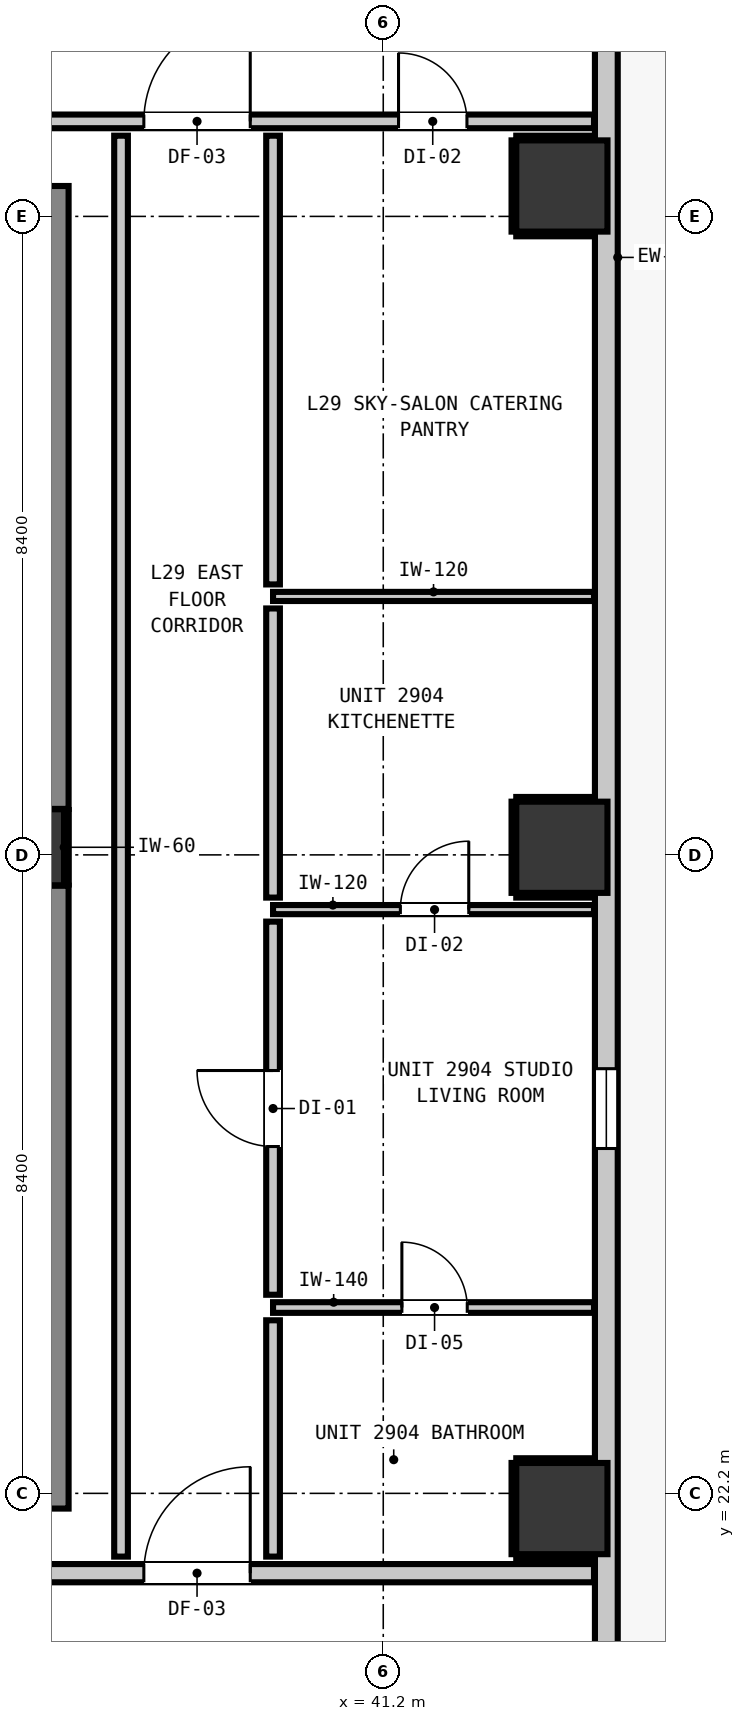
"""IFC4 building model, lengths in metres.
Left out: names, types, materials, properties, quantities, classifications, styles, units other than length and angle.
Written with IfcOpenShell. Run it as: python <this file> out.ifc"""

import sys

from ifc_helpers import new_model, si_unit, direction, frame, frame_2d, origin, origin_2d, place, context, subcontext, project, spatial, rectangle, extrude, element, fill, save


model = new_model("IFC4")
c1 = context("Model", 3, precision=1e-05, world=origin(), true_north=direction((0.0, 1.0)))
c2 = subcontext(c1, "Body", "Model", "MODEL_VIEW")
j1 = project(units=[si_unit("LENGTHUNIT", "METRE"), si_unit("PLANEANGLEUNIT", "RADIAN")], contexts=[c1])
p1 = place(None, origin())
s1 = spatial("IfcSite", under=j1, at=p1, CompositionType="ELEMENT")
p2 = place(p1, origin())
s2 = spatial("IfcBuilding", under=s1, at=p2, CompositionType="ELEMENT")
p3 = place(p2, frame((0.0, 0.0, 102.76)))
s3 = spatial("IfcBuildingStorey", under=s2, at=p3, CompositionType="ELEMENT", Elevation=102.76)
p4 = place(p3, frame((36.5, 30.7, 0.0), z_axis=(0.0, 0.0, 1.0), x_axis=(1.0, 0.0, 0.0)))
e1 = element("IfcColumn", 1, at=p4, inside=s3, PredefinedType="COLUMN", context=c2, shape_type="SweptSolid", body=[
    extrude(rectangle(XDim=1.0, YDim=1.0, at=origin_2d()), origin(), (0.0, 0.0, 1.0), 3.32),
])
p5 = place(p3, frame((36.56, 22.0, 0.0), z_axis=(0.0, 0.0, 1.0), x_axis=(0.0, 1.0, 0.0)))
e2 = element("IfcWall", 2, at=p5, inside=s3, PredefinedType="SHEAR", context=c2, shape_type="SweptSolid", body=[
    extrude(rectangle(XDim=8.195, YDim=1.0, at=frame_2d((4.098, 0.0))), origin(), (0.0, 0.0, 1.0), 3.32),
])
p6 = place(p3, frame((36.56, 31.205, 0.0), z_axis=(0.0, 0.0, 1.0), x_axis=(0.0, 1.0, 0.0)))
e3 = element("IfcWall", 3, at=p6, inside=s3, PredefinedType="SHEAR", context=c2, shape_type="SweptSolid", body=[
    extrude(rectangle(XDim=8.195, YDim=1.0, at=frame_2d((4.097, 0.0))), origin(), (0.0, 0.0, 1.0), 3.32),
])
for number, where, z_axis, x_axis in (
    (4, (43.55, 22.0, 0.0), (0.0, 0.0, 1.0), (1.0, 0.0, 0.0)),
    (5, (43.55, 30.7, 0.0), (0.0, 0.0, 1.0), (1.0, 0.0, 0.0)),
    (6, (43.55, 39.4, 0.0), (0.0, 0.0, 1.0), (1.0, 0.0, 0.0)),
):
    element("IfcColumn", number, at=place(p3, frame(where, z_axis=z_axis, x_axis=x_axis)), inside=s3, PredefinedType="COLUMN", context=c2, shape_type="SweptSolid", body=[
        extrude(rectangle(XDim=1.2, YDim=1.2, at=origin_2d()), origin(), (0.0, 0.0, 1.0), 2.9),
    ])
p7 = place(p3, frame((44.135, 51.035, 0.0), z_axis=(0.0, 0.0, 1.0), x_axis=(0.0, -1.0, 0.0)))
e7 = element("IfcWall", 7, at=p7, inside=s3, PredefinedType="STANDARD", context=c2, shape_type="SweptSolid", body=[
    extrude(rectangle(XDim=34.67, YDim=0.3, at=frame_2d((17.335, 0.0))), origin(), (0.0, 0.0, 1.0), 2.9),
])
p8 = place(p7, frame((0.901, 0.0, 0.0)))
e8 = element("IfcOpeningElement", 8, at=p8, cuts=e7, PredefinedType="OPENING", context=c2, shape_type="SweptSolid", body=[
    extrude(rectangle(XDim=1.0, YDim=2.15, at=frame_2d((0.5, 1.075))), frame((0.0, 0.16, 0.0), z_axis=(0.0, -1.0, 0.0), x_axis=(1.0, 0.0, 0.0)), (0.0, 0.0, 1.0), 0.32),
])
p9 = place(p7, frame((32.608, 0.0, 0.85)))
e9 = element("IfcOpeningElement", 9, at=p9, cuts=e7, PredefinedType="OPENING", context=c2, shape_type="SweptSolid", body=[
    extrude(rectangle(XDim=1.05, YDim=1.65, at=frame_2d((0.525, 0.825))), frame((0.0, 0.16, 0.0), z_axis=(0.0, -1.0, 0.0), x_axis=(1.0, 0.0, 0.0)), (0.0, 0.0, 1.0), 0.32),
])
p10 = place(p7, frame((23.248, 0.0, 0.85)))
e10 = element("IfcOpeningElement", 10, at=p10, cuts=e7, PredefinedType="OPENING", context=c2, shape_type="SweptSolid", body=[
    extrude(rectangle(XDim=1.05, YDim=1.65, at=frame_2d((0.525, 0.825))), frame((0.0, 0.16, 0.0), z_axis=(0.0, -1.0, 0.0), x_axis=(1.0, 0.0, 0.0)), (0.0, 0.0, 1.0), 0.32),
])
p11 = place(p3, frame((1.827, 21.15, 0.0), z_axis=(0.0, 0.0, 1.0), x_axis=(1.0, 0.0, 0.0)))
e11 = element("IfcWall", 11, at=p11, inside=s3, PredefinedType="PARTITIONING", context=c2, shape_type="SweptSolid", body=[
    extrude(rectangle(XDim=42.146, YDim=0.24, at=frame_2d((21.073, 0.0))), origin(), (0.0, 0.0, 1.0), 2.9),
])
p12 = place(p11, frame((16.383, 0.0, 0.0)))
e12 = element("IfcOpeningElement", 12, at=p12, cuts=e11, PredefinedType="OPENING", context=c2, shape_type="SweptSolid", body=[
    extrude(rectangle(XDim=1.1, YDim=2.15, at=frame_2d((0.55, 1.075))), frame((0.0, 0.13, 0.0), z_axis=(0.0, -1.0, 0.0), x_axis=(1.0, 0.0, 0.0)), (0.0, 0.0, 1.0), 0.26),
])
p13 = place(p11, frame((8.623, 0.0, 0.0)))
e13 = element("IfcOpeningElement", 13, at=p13, cuts=e11, PredefinedType="OPENING", context=c2, shape_type="SweptSolid", body=[
    extrude(rectangle(XDim=1.4, YDim=2.15, at=frame_2d((0.7, 1.075))), frame((0.0, 0.13, 0.0), z_axis=(0.0, -1.0, 0.0), x_axis=(1.0, 0.0, 0.0)), (0.0, 0.0, 1.0), 0.26),
])
p14 = place(p11, frame((36.223, 0.0, 0.0)))
e14 = element("IfcOpeningElement", 14, at=p14, cuts=e11, PredefinedType="OPENING", context=c2, shape_type="SweptSolid", body=[
    extrude(rectangle(XDim=1.4, YDim=2.15, at=frame_2d((0.7, 1.075))), frame((0.0, 0.13, 0.0), z_axis=(0.0, -1.0, 0.0), x_axis=(1.0, 0.0, 0.0)), (0.0, 0.0, 1.0), 0.26),
])
p15 = place(p3, frame((1.827, 40.25, 0.0), z_axis=(0.0, 0.0, 1.0), x_axis=(1.0, 0.0, 0.0)))
e15 = element("IfcWall", 15, at=p15, inside=s3, PredefinedType="PARTITIONING", context=c2, shape_type="SweptSolid", body=[
    extrude(rectangle(XDim=42.146, YDim=0.18, at=frame_2d((21.073, 0.0))), origin(), (0.0, 0.0, 1.0), 2.9),
])
p16 = place(p15, frame((15.608, 0.0, 0.0)))
e16 = element("IfcOpeningElement", 16, at=p16, cuts=e15, PredefinedType="OPENING", context=c2, shape_type="SweptSolid", body=[
    extrude(rectangle(XDim=1.4, YDim=2.15, at=frame_2d((0.7, 1.075))), frame((0.0, 0.1, 0.0), z_axis=(0.0, -1.0, 0.0), x_axis=(1.0, 0.0, 0.0)), (0.0, 0.0, 1.0), 0.2),
])
p17 = place(p15, frame((8.623, 0.0, 0.0)))
e17 = element("IfcOpeningElement", 17, at=p17, cuts=e15, PredefinedType="OPENING", context=c2, shape_type="SweptSolid", body=[
    extrude(rectangle(XDim=1.4, YDim=2.15, at=frame_2d((0.7, 1.075))), frame((0.0, 0.1, 0.0), z_axis=(0.0, -1.0, 0.0), x_axis=(1.0, 0.0, 0.0)), (0.0, 0.0, 1.0), 0.2),
])
p18 = place(p15, frame((36.223, 0.0, 0.0)))
e18 = element("IfcOpeningElement", 18, at=p18, cuts=e15, PredefinedType="OPENING", context=c2, shape_type="SweptSolid", body=[
    extrude(rectangle(XDim=1.4, YDim=2.15, at=frame_2d((0.7, 1.075))), frame((0.0, 0.1, 0.0), z_axis=(0.0, -1.0, 0.0), x_axis=(1.0, 0.0, 0.0)), (0.0, 0.0, 1.0), 0.2),
])
p19 = place(p15, frame((3.697, 0.0, 0.0)))
e19 = element("IfcOpeningElement", 19, at=p19, cuts=e15, PredefinedType="OPENING", context=c2, shape_type="SweptSolid", body=[
    extrude(rectangle(XDim=0.95, YDim=2.1, at=frame_2d((0.475, 1.05))), frame((0.0, 0.1, 0.0), z_axis=(0.0, -1.0, 0.0), x_axis=(1.0, 0.0, 0.0)), (0.0, 0.0, 1.0), 0.2),
])
p20 = place(p15, frame((39.574, 0.0, 0.0)))
e20 = element("IfcOpeningElement", 20, at=p20, cuts=e15, PredefinedType="OPENING", context=c2, shape_type="SweptSolid", body=[
    extrude(rectangle(XDim=0.9, YDim=2.1, at=frame_2d((0.45, 1.05))), frame((0.0, 0.1, 0.0), z_axis=(0.0, -1.0, 0.0), x_axis=(1.0, 0.0, 0.0)), (0.0, 0.0, 1.0), 0.2),
])
p21 = place(p3, frame((39.75, 24.645, 0.0), z_axis=(0.0, 0.0, 1.0), x_axis=(1.0, 0.0, 0.0)))
e21 = element("IfcWall", 21, at=p21, inside=s3, PredefinedType="PARTITIONING", context=c2, shape_type="SweptSolid", body=[
    extrude(rectangle(XDim=4.223, YDim=0.14, at=frame_2d((2.111, 0.0))), origin(), (0.0, 0.0, 1.0), 2.9),
])
p22 = place(p21, frame((1.695, 0.0, 0.0)))
e22 = element("IfcOpeningElement", 22, at=p22, cuts=e21, PredefinedType="OPENING", context=c2, shape_type="SweptSolid", body=[
    extrude(rectangle(XDim=0.86, YDim=2.02, at=frame_2d((0.43, 1.01))), frame((0.0, 0.08, 0.0), z_axis=(0.0, -1.0, 0.0), x_axis=(1.0, 0.0, 0.0)), (0.0, 0.0, 1.0), 0.16),
])
p23 = place(p3, frame((39.75, 29.88, 0.0), z_axis=(0.0, 0.0, 1.0), x_axis=(1.0, 0.0, 0.0)))
e23 = element("IfcWall", 23, at=p23, inside=s3, PredefinedType="PARTITIONING", context=c2, shape_type="SweptSolid", body=[
    extrude(rectangle(XDim=4.223, YDim=0.12, at=frame_2d((2.111, 0.0))), origin(), (0.0, 0.0, 1.0), 2.9),
])
p24 = place(p23, frame((1.675, 0.0, 0.0)))
e24 = element("IfcOpeningElement", 24, at=p24, cuts=e23, PredefinedType="OPENING", context=c2, shape_type="SweptSolid", body=[
    extrude(rectangle(XDim=0.9, YDim=2.1, at=frame_2d((0.45, 1.05))), frame((0.0, 0.07, 0.0), z_axis=(0.0, -1.0, 0.0), x_axis=(1.0, 0.0, 0.0)), (0.0, 0.0, 1.0), 0.14),
])
p25 = place(p3, frame((39.75, 34.0, 0.0), z_axis=(0.0, 0.0, 1.0), x_axis=(1.0, 0.0, 0.0)))
e25 = element("IfcWall", 25, at=p25, inside=s3, PredefinedType="PARTITIONING", context=c2, shape_type="SweptSolid", body=[
    extrude(rectangle(XDim=4.223, YDim=0.12, at=frame_2d((2.111, 0.0))), origin(), (0.0, 0.0, 1.0), 2.9),
])
p26 = place(p3, frame((37.75, 21.368, 0.0), z_axis=(0.0, 0.0, 1.0), x_axis=(0.0, 1.0, 0.0)))
e26 = element("IfcWall", 26, at=p26, inside=s3, PredefinedType="PARTITIONING", context=c2, shape_type="SweptSolid", body=[
    extrude(rectangle(XDim=18.694, YDim=0.18, at=frame_2d((9.347, 0.0))), origin(), (0.0, 0.0, 1.0), 2.9),
])
p27 = place(p3, frame((39.75, 21.368, 0.0), z_axis=(0.0, 0.0, 1.0), x_axis=(0.0, 1.0, 0.0)))
e27 = element("IfcWall", 27, at=p27, inside=s3, PredefinedType="PARTITIONING", context=c2, shape_type="SweptSolid", body=[
    extrude(rectangle(XDim=3.109, YDim=0.18, at=frame_2d((1.555, 0.0))), origin(), (0.0, 0.0, 1.0), 2.9),
])
p28 = place(p3, frame((39.75, 24.813, 0.0), z_axis=(0.0, 0.0, 1.0), x_axis=(0.0, 1.0, 0.0)))
e28 = element("IfcWall", 28, at=p28, inside=s3, PredefinedType="PARTITIONING", context=c2, shape_type="SweptSolid", body=[
    extrude(rectangle(XDim=4.909, YDim=0.18, at=frame_2d((2.455, 0.0))), origin(), (0.0, 0.0, 1.0), 2.9),
])
p29 = place(p28, frame((1.95, 0.0, 0.0)))
e29 = element("IfcOpeningElement", 29, at=p29, cuts=e28, PredefinedType="OPENING", context=c2, shape_type="SweptSolid", body=[
    extrude(rectangle(XDim=1.0, YDim=2.15, at=frame_2d((0.5, 1.075))), frame((0.0, 0.1, 0.0), z_axis=(0.0, -1.0, 0.0), x_axis=(1.0, 0.0, 0.0)), (0.0, 0.0, 1.0), 0.2),
])
p30 = place(p3, frame((39.75, 30.038, 0.0), z_axis=(0.0, 0.0, 1.0), x_axis=(0.0, 1.0, 0.0)))
e30 = element("IfcWall", 30, at=p30, inside=s3, PredefinedType="PARTITIONING", context=c2, shape_type="SweptSolid", body=[
    extrude(rectangle(XDim=3.804, YDim=0.18, at=frame_2d((1.902, 0.0))), origin(), (0.0, 0.0, 1.0), 2.9),
])
p31 = place(p3, frame((39.75, 34.158, 0.0), z_axis=(0.0, 0.0, 1.0), x_axis=(0.0, 1.0, 0.0)))
e31 = element("IfcWall", 31, at=p31, inside=s3, PredefinedType="PARTITIONING", context=c2, shape_type="SweptSolid", body=[
    extrude(rectangle(XDim=5.904, YDim=0.18, at=frame_2d((2.952, 0.0))), origin(), (0.0, 0.0, 1.0), 2.9),
])
p32 = place(p3, frame((37.032, 30.21, 0.0), z_axis=(0.0, 0.0, 1.0), x_axis=(0.0, 1.0, 0.0)))
e32 = element("IfcWall", 32, at=p32, inside=s3, PredefinedType="PARTITIONING", context=c2, shape_type="SweptSolid", body=[
    extrude(rectangle(XDim=0.98, YDim=0.06, at=frame_2d((0.49, 0.0))), origin(), (0.0, 0.0, 1.0), 0.905),
])
for number, where, z_axis, x_axis in (
    (33, (42.95, 21.368, 0.0), (0.0, 0.0, 1.0), (1.0, 0.0, 0.0)),
    (34, (42.95, 22.632, 0.0), (0.0, 0.0, 1.0), (1.0, 0.0, 0.0)),
):
    element("IfcWall", number, at=place(p3, frame(where, z_axis=z_axis, x_axis=x_axis)), inside=s3, PredefinedType="PARTITIONING", context=c2, shape_type="SweptSolid", body=[
        extrude(rectangle(XDim=1.02, YDim=0.06, at=frame_2d((0.51, 0.0))), origin(), (0.0, 0.0, 1.0), 0.905),
    ])
p33 = place(p3, frame((42.918, 21.4, 0.0), z_axis=(0.0, 0.0, 1.0), x_axis=(0.0, 1.0, 0.0)))
e35 = element("IfcWall", 35, at=p33, inside=s3, PredefinedType="PARTITIONING", context=c2, shape_type="SweptSolid", body=[
    extrude(rectangle(XDim=1.2, YDim=0.06, at=frame_2d((0.6, 0.0))), origin(), (0.0, 0.0, 1.0), 1.45),
])
for number, where, z_axis, x_axis in (
    (36, (42.95, 30.068, 0.0), (0.0, 0.0, 1.0), (1.0, 0.0, 0.0)),
    (37, (42.95, 31.332, 0.0), (0.0, 0.0, 1.0), (1.0, 0.0, 0.0)),
):
    element("IfcWall", number, at=place(p3, frame(where, z_axis=z_axis, x_axis=x_axis)), inside=s3, PredefinedType="PARTITIONING", context=c2, shape_type="SweptSolid", body=[
        extrude(rectangle(XDim=1.02, YDim=0.06, at=frame_2d((0.51, 0.0))), origin(), (0.0, 0.0, 1.0), 0.905),
    ])
p34 = place(p3, frame((42.918, 30.1, 0.0), z_axis=(0.0, 0.0, 1.0), x_axis=(0.0, 1.0, 0.0)))
e38 = element("IfcWall", 38, at=p34, inside=s3, PredefinedType="PARTITIONING", context=c2, shape_type="SweptSolid", body=[
    extrude(rectangle(XDim=1.2, YDim=0.06, at=frame_2d((0.6, 0.0))), origin(), (0.0, 0.0, 1.0), 1.45),
])
for number, where, z_axis, x_axis in (
    (39, (42.95, 38.768, 0.0), (0.0, 0.0, 1.0), (1.0, 0.0, 0.0)),
    (40, (42.95, 40.032, 0.0), (0.0, 0.0, 1.0), (1.0, 0.0, 0.0)),
):
    element("IfcWall", number, at=place(p3, frame(where, z_axis=z_axis, x_axis=x_axis)), inside=s3, PredefinedType="PARTITIONING", context=c2, shape_type="SweptSolid", body=[
        extrude(rectangle(XDim=1.02, YDim=0.06, at=frame_2d((0.51, 0.0))), origin(), (0.0, 0.0, 1.0), 0.905),
    ])
p35 = place(p3, frame((42.918, 38.8, 0.0), z_axis=(0.0, 0.0, 1.0), x_axis=(0.0, 1.0, 0.0)))
e41 = element("IfcWall", 41, at=p35, inside=s3, PredefinedType="PARTITIONING", context=c2, shape_type="SweptSolid", body=[
    extrude(rectangle(XDim=1.2, YDim=0.06, at=frame_2d((0.6, 0.0))), origin(), (0.0, 0.0, 1.0), 1.45),
])
p36 = place(p10, origin())
e42 = element("IfcWindow", 42, at=p36, inside=s3, PartitioningType="SINGLE_PANEL", PredefinedType="WINDOW", context=c2, shape_type="SweptSolid", body=[
    extrude(rectangle(XDim=1.05, YDim=1.65, at=frame_2d((0.525, 0.825))), frame((0.0, 0.03, 0.0), z_axis=(0.0, -1.0, 0.0), x_axis=(1.0, 0.0, 0.0)), (0.0, 0.0, 1.0), 0.06),
])
fill(e10, e42)
p37 = place(p14, origin())
e43 = element("IfcDoor", 43, at=p37, inside=s3, OperationType="SINGLE_SWING_RIGHT", PredefinedType="DOOR", context=c2, shape_type="SweptSolid", body=[
    extrude(rectangle(XDim=1.4, YDim=2.15, at=frame_2d((0.7, 1.075))), frame((0.0, 0.025, 0.0), z_axis=(0.0, -1.0, 0.0), x_axis=(1.0, 0.0, 0.0)), (0.0, 0.0, 1.0), 0.05),
])
fill(e14, e43)
p38 = place(p18, origin())
e44 = element("IfcDoor", 44, at=p38, inside=s3, OperationType="SINGLE_SWING_RIGHT", PredefinedType="DOOR", context=c2, shape_type="SweptSolid", body=[
    extrude(rectangle(XDim=1.4, YDim=2.15, at=frame_2d((0.7, 1.075))), frame((0.0, 0.025, 0.0), z_axis=(0.0, -1.0, 0.0), x_axis=(1.0, 0.0, 0.0)), (0.0, 0.0, 1.0), 0.05),
])
fill(e18, e44)
p39 = place(p29, origin())
e45 = element("IfcDoor", 45, at=p39, inside=s3, OperationType="SINGLE_SWING_RIGHT", PredefinedType="DOOR", context=c2, shape_type="SweptSolid", body=[
    extrude(rectangle(XDim=1.0, YDim=2.15, at=frame_2d((0.5, 1.075))), frame((0.0, 0.025, 0.0), z_axis=(0.0, -1.0, 0.0), x_axis=(1.0, 0.0, 0.0)), (0.0, 0.0, 1.0), 0.05),
])
fill(e29, e45)
p40 = place(p22, origin())
e46 = element("IfcDoor", 46, at=p40, inside=s3, OperationType="SINGLE_SWING_LEFT", PredefinedType="DOOR", context=c2, shape_type="SweptSolid", body=[
    extrude(rectangle(XDim=0.86, YDim=2.02, at=frame_2d((0.43, 1.01))), frame((0.0, 0.025, 0.0), z_axis=(0.0, -1.0, 0.0), x_axis=(1.0, 0.0, 0.0)), (0.0, 0.0, 1.0), 0.05),
])
fill(e22, e46)
p41 = place(p24, origin())
e47 = element("IfcDoor", 47, at=p41, inside=s3, OperationType="SINGLE_SWING_RIGHT", PredefinedType="DOOR", context=c2, shape_type="SweptSolid", body=[
    extrude(rectangle(XDim=0.9, YDim=2.1, at=frame_2d((0.45, 1.05))), frame((0.0, 0.025, 0.0), z_axis=(0.0, -1.0, 0.0), x_axis=(1.0, 0.0, 0.0)), (0.0, 0.0, 1.0), 0.05),
])
fill(e24, e47)
p42 = place(p20, origin())
e48 = element("IfcDoor", 48, at=p42, inside=s3, OperationType="SINGLE_SWING_LEFT", PredefinedType="DOOR", context=c2, shape_type="SweptSolid", body=[
    extrude(rectangle(XDim=0.9, YDim=2.1, at=frame_2d((0.45, 1.05))), frame((0.0, 0.025, 0.0), z_axis=(0.0, -1.0, 0.0), x_axis=(1.0, 0.0, 0.0)), (0.0, 0.0, 1.0), 0.05),
])
fill(e20, e48)
save(model, sys.argv[1])
